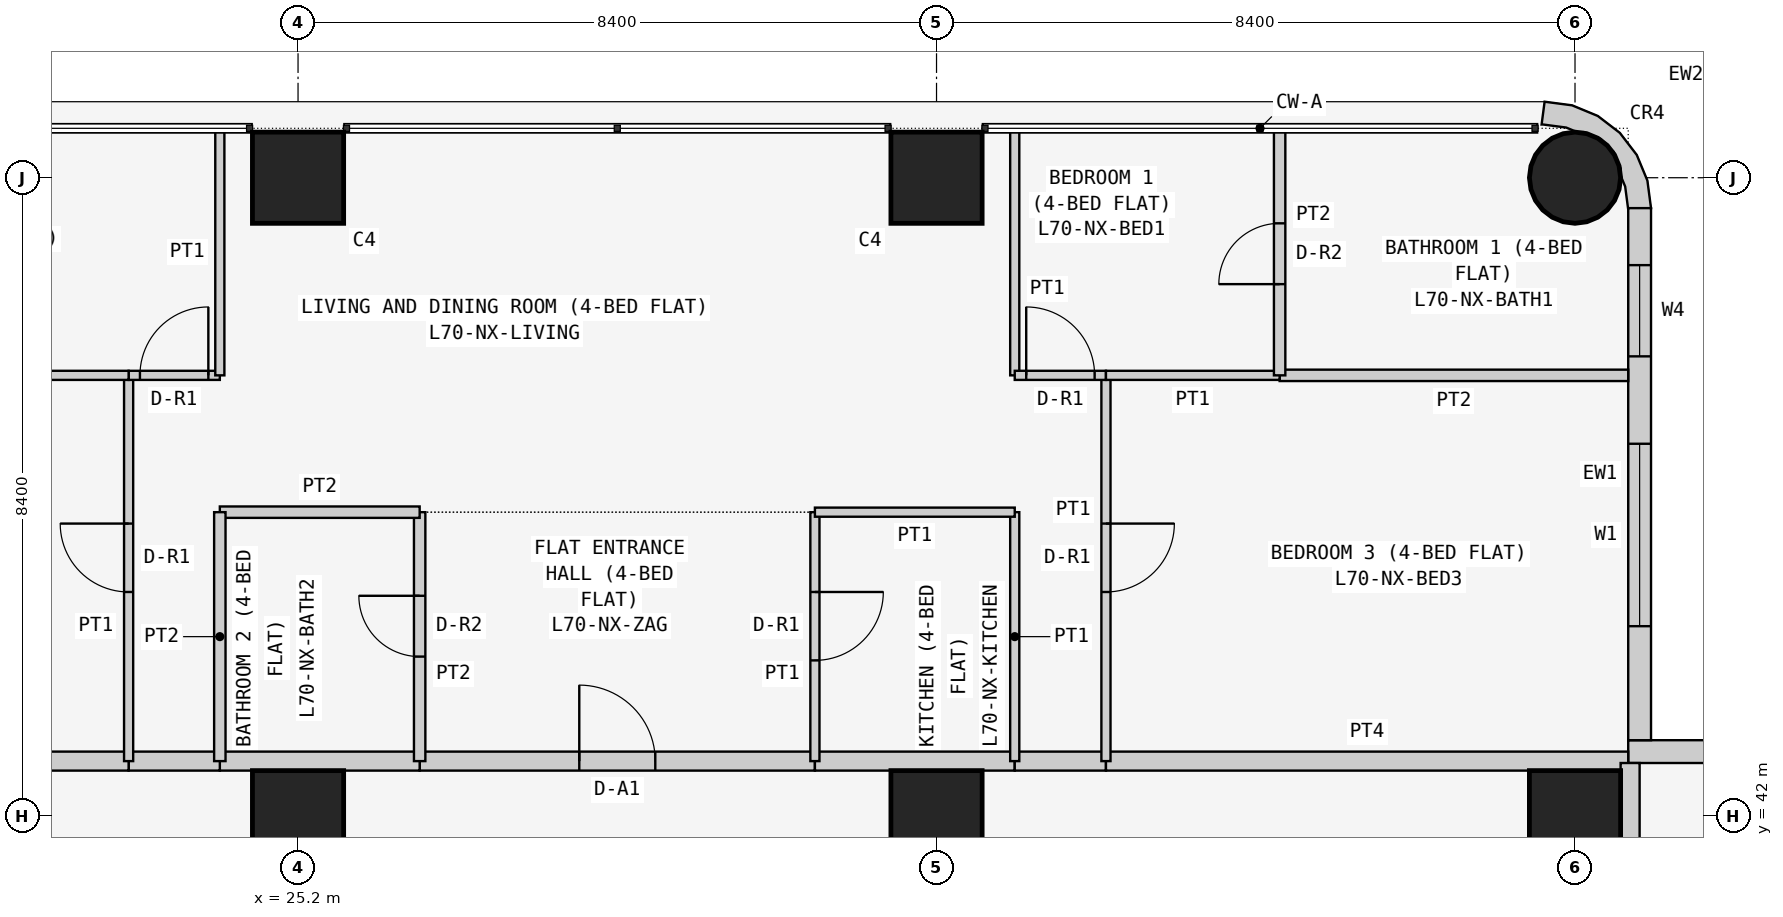
"""IFC4 building model, lengths in metres.
Left out: names, types, materials, properties, quantities, classifications, styles, units other than length and angle.
Written with IfcOpenShell. Run it as: python <this file> out.ifc"""

import sys

from ifc_helpers import new_model, si_unit, direction, frame, frame_2d, origin, origin_2d, place, context, subcontext, project, spatial, polyline, rectangle, circle, outline, extrude, element, fill, save


model = new_model("IFC4")
c1 = context("Model", 3, precision=1e-05, world=origin(), true_north=direction((0.0, 1.0)))
c2 = subcontext(c1, "Body", "Model", "MODEL_VIEW")
j1 = project(units=[si_unit("LENGTHUNIT", "METRE"), si_unit("PLANEANGLEUNIT", "RADIAN")], contexts=[c1])
p1 = place(None, origin())
s1 = spatial("IfcSite", under=j1, at=p1, CompositionType="ELEMENT")
p2 = place(p1, origin())
s2 = spatial("IfcBuilding", under=s1, at=p2, CompositionType="ELEMENT")
p3 = place(p2, frame((0.0, 0.0, 268.5)))
s3 = spatial("IfcBuildingStorey", under=s2, at=p3, CompositionType="ELEMENT", Elevation=268.5)
for number, where, z_axis, x_axis in (
    (1, (25.2, 42.0, 0.0), (0.0, 0.0, 1.0), (1.0, 0.0, 0.0)),
    (2, (25.2, 50.4, 0.0), (0.0, 0.0, 1.0), (1.0, 0.0, 0.0)),
    (3, (33.6, 42.0, 0.0), (0.0, 0.0, 1.0), (1.0, 0.0, 0.0)),
    (4, (33.6, 50.4, 0.0), (0.0, 0.0, 1.0), (1.0, 0.0, 0.0)),
    (5, (42.0, 42.0, 0.0), (0.0, 0.0, 1.0), (1.0, 0.0, 0.0)),
):
    element("IfcColumn", number, at=place(p3, frame(where, z_axis=z_axis, x_axis=x_axis)), inside=s3, PredefinedType="COLUMN", context=c2, shape_type="SweptSolid", body=[
        extrude(rectangle(XDim=1.2, YDim=1.2, at=origin_2d()), origin(), (0.0, 0.0, 1.0), 3.6),
    ])
p4 = place(p3, frame((42.0, 50.4, 0.0), z_axis=(0.0, 0.0, 1.0), x_axis=(1.0, 0.0, 0.0)))
e6 = element("IfcColumn", 6, at=p4, inside=s3, PredefinedType="COLUMN", context=c2, shape_type="SweptSolid", body=[
    extrude(circle(Radius=0.6, at=origin_2d()), origin(), (0.0, 0.0, 1.0), 3.6),
])
p5 = place(p3, frame((50.0, 42.85, 0.0), z_axis=(0.0, 0.0, 1.0), x_axis=(-1.0, 0.0, 0.0)))
e7 = element("IfcWall", 7, at=p5, inside=s3, PredefinedType="SOLIDWALL", context=c2, shape_type="SweptSolid", body=[
    extrude(rectangle(XDim=7.3, YDim=0.3, at=frame_2d((3.65, 0.0))), origin(), (0.0, 0.0, 1.0), 3.45),
])
p6 = place(p5, frame((3.1, 0.0, 0.9)))
e8 = element("IfcOpeningElement", 8, at=p6, cuts=e7, PredefinedType="OPENING", context=c2, shape_type="SweptSolid", body=[
    extrude(rectangle(XDim=2.4, YDim=1.5, at=frame_2d((1.2, 0.75))), frame((0.0, 0.16, 0.0), z_axis=(0.0, -1.0, 0.0), x_axis=(1.0, 0.0, 0.0)), (0.0, 0.0, 1.0), 0.32),
])
p7 = place(p5, frame((0.75, 0.0, 0.9)))
e9 = element("IfcOpeningElement", 9, at=p7, cuts=e7, PredefinedType="OPENING", context=c2, shape_type="SweptSolid", body=[
    extrude(rectangle(XDim=1.2, YDim=1.5, at=frame_2d((0.6, 0.75))), frame((0.0, 0.16, 0.0), z_axis=(0.0, -1.0, 0.0), x_axis=(1.0, 0.0, 0.0)), (0.0, 0.0, 1.0), 0.32),
])
p8 = place(p3, frame((42.85, 43.0, 0.0), z_axis=(0.0, 0.0, 1.0), x_axis=(0.0, 1.0, 0.0)))
e10 = element("IfcWall", 10, at=p8, inside=s3, PredefinedType="SOLIDWALL", context=c2, shape_type="SweptSolid", body=[
    extrude(rectangle(XDim=7.0, YDim=0.3, at=frame_2d((3.5, 0.0))), origin(), (0.0, 0.0, 1.0), 3.45),
])
p9 = place(p8, frame((1.5, 0.0, 0.9)))
e11 = element("IfcOpeningElement", 11, at=p9, cuts=e10, PredefinedType="OPENING", context=c2, shape_type="SweptSolid", body=[
    extrude(rectangle(XDim=2.4, YDim=1.5, at=frame_2d((1.2, 0.75))), frame((0.0, 0.16, 0.0), z_axis=(0.0, -1.0, 0.0), x_axis=(1.0, 0.0, 0.0)), (0.0, 0.0, 1.0), 0.32),
])
p10 = place(p8, frame((5.05, 0.0, 0.9)))
e12 = element("IfcOpeningElement", 12, at=p10, cuts=e10, PredefinedType="OPENING", context=c2, shape_type="SweptSolid", body=[
    extrude(rectangle(XDim=1.2, YDim=1.5, at=frame_2d((0.6, 0.75))), frame((0.0, 0.16, 0.0), z_axis=(0.0, -1.0, 0.0), x_axis=(1.0, 0.0, 0.0)), (0.0, 0.0, 1.0), 0.32),
])
p11 = place(p3, frame((42.576, 50.038, 0.0), z_axis=(0.0, 0.0, 1.0), x_axis=(0.707106781187, 0.707106781187, 0.0)))
e13 = element("IfcWall", 13, at=p11, inside=s3, PredefinedType="SOLIDWALL", context=c2, shape_type="SweptSolid", body=[
    extrude(outline(polyline([(0.233, 0.114), (0.047, -0.129), (0.033, -0.143), (0.273, -0.327), (0.495, -0.037), (0.635, 0.3), (0.683, 0.663), (0.635, 1.025), (0.495, 1.363), (0.273, 1.653), (0.033, 1.469), (0.047, 1.455), (0.233, 1.212), (0.292, 1.069), (0.358, 1.003), (0.449, 0.782), (0.449, 0.543), (0.358, 0.322), (0.292, 0.257), (0.233, 0.114)])), origin(), (0.0, 0.0, 1.0), 3.45),
])
p12 = place(p3, frame((26.8, 42.725, 0.0), z_axis=(0.0, 0.0, 1.0), x_axis=(1.0, 0.0, 0.0)))
e14 = element("IfcWall", 14, at=p12, inside=s3, PredefinedType="PARTITIONING", context=c2, shape_type="SweptSolid", body=[
    extrude(rectangle(XDim=5.2, YDim=0.25, at=frame_2d((2.6, 0.0))), origin(), (0.0, 0.0, 1.0), 3.45),
])
p13 = place(p12, frame((2.1, 0.0, 0.0)))
e15 = element("IfcOpeningElement", 15, at=p13, cuts=e14, PredefinedType="OPENING", context=c2, shape_type="SweptSolid", body=[
    extrude(rectangle(XDim=1.0, YDim=2.1, at=frame_2d((0.5, 1.05))), frame((0.0, 0.135, 0.0), z_axis=(0.0, -1.0, 0.0), x_axis=(1.0, 0.0, 0.0)), (0.0, 0.0, 1.0), 0.27),
])
p14 = place(p3, frame((24.171, 42.725, 0.0), z_axis=(0.0, 0.0, 1.0), x_axis=(1.0, 0.0, 0.0)))
e16 = element("IfcWall", 16, at=p14, inside=s3, PredefinedType="PARTITIONING", context=c2, shape_type="SweptSolid", body=[
    extrude(rectangle(XDim=2.629, YDim=0.25, at=frame_2d((1.314, 0.0))), origin(), (0.0, 0.0, 1.0), 3.45),
])
p15 = place(p3, frame((32.0, 42.725, 0.0), z_axis=(0.0, 0.0, 1.0), x_axis=(1.0, 0.0, 0.0)))
e17 = element("IfcWall", 17, at=p15, inside=s3, PredefinedType="PARTITIONING", context=c2, shape_type="SweptSolid", body=[
    extrude(rectangle(XDim=2.629, YDim=0.25, at=frame_2d((1.314, 0.0))), origin(), (0.0, 0.0, 1.0), 3.45),
])
p16 = place(p3, frame((22.971, 42.725, 0.0), z_axis=(0.0, 0.0, 1.0), x_axis=(1.0, 0.0, 0.0)))
e18 = element("IfcWall", 18, at=p16, inside=s3, PredefinedType="PARTITIONING", context=c2, shape_type="SweptSolid", body=[
    extrude(rectangle(XDim=1.2, YDim=0.25, at=frame_2d((0.6, 0.0))), origin(), (0.0, 0.0, 1.0), 3.45),
])
p17 = place(p3, frame((34.629, 42.725, 0.0), z_axis=(0.0, 0.0, 1.0), x_axis=(1.0, 0.0, 0.0)))
e19 = element("IfcWall", 19, at=p17, inside=s3, PredefinedType="PARTITIONING", context=c2, shape_type="SweptSolid", body=[
    extrude(rectangle(XDim=1.2, YDim=0.25, at=frame_2d((0.6, 0.0))), origin(), (0.0, 0.0, 1.0), 3.45),
])
for number, where, z_axis, x_axis in (
    (20, (16.1, 42.725, 0.0), (0.0, 0.0, 1.0), (1.0, 0.0, 0.0)),
    (21, (35.829, 42.725, 0.0), (0.0, 0.0, 1.0), (1.0, 0.0, 0.0)),
    (22, (42.725, 42.7, 0.0), (0.0, 0.0, 1.0), (0.0, -1.0, 0.0)),
):
    element("IfcWall", number, at=place(p3, frame(where, z_axis=z_axis, x_axis=x_axis)), inside=s3, PredefinedType="PARTITIONING", context=c2, shape_type="SweptSolid", body=[
        extrude(rectangle(XDim=6.871, YDim=0.25, at=frame_2d((3.436, 0.0))), origin(), (0.0, 0.0, 1.0), 3.45),
    ])
p18 = place(p3, frame((26.8, 46.0, 0.0), z_axis=(0.0, 0.0, 1.0), x_axis=(0.0, -1.0, 0.0)))
e23 = element("IfcWall", 23, at=p18, inside=s3, PredefinedType="PARTITIONING", context=c2, shape_type="SweptSolid", body=[
    extrude(rectangle(XDim=3.275, YDim=0.15, at=frame_2d((1.637, 0.0))), origin(), (0.0, 0.0, 1.0), 3.45),
])
p19 = place(p18, frame((1.1, 0.0, 0.0)))
e24 = element("IfcOpeningElement", 24, at=p19, cuts=e23, PredefinedType="OPENING", context=c2, shape_type="SweptSolid", body=[
    extrude(rectangle(XDim=0.8, YDim=2.1, at=frame_2d((0.4, 1.05))), frame((0.0, 0.085, 0.0), z_axis=(0.0, -1.0, 0.0), x_axis=(1.0, 0.0, 0.0)), (0.0, 0.0, 1.0), 0.17),
])
p20 = place(p3, frame((32.0, 42.725, 0.0), z_axis=(0.0, 0.0, 1.0), x_axis=(0.0, 1.0, 0.0)))
e25 = element("IfcWall", 25, at=p20, inside=s3, PredefinedType="PARTITIONING", context=c2, shape_type="SweptSolid", body=[
    extrude(rectangle(XDim=3.275, YDim=0.12, at=frame_2d((1.637, 0.0))), origin(), (0.0, 0.0, 1.0), 3.45),
])
p21 = place(p20, frame((1.325, 0.0, 0.0)))
e26 = element("IfcOpeningElement", 26, at=p21, cuts=e25, PredefinedType="OPENING", context=c2, shape_type="SweptSolid", body=[
    extrude(rectangle(XDim=0.9, YDim=2.1, at=frame_2d((0.45, 1.05))), frame((0.0, 0.07, 0.0), z_axis=(0.0, -1.0, 0.0), x_axis=(1.0, 0.0, 0.0)), (0.0, 0.0, 1.0), 0.14),
])
p22 = place(p3, frame((26.8, 46.0, 0.0), z_axis=(0.0, 0.0, 1.0), x_axis=(-1.0, 0.0, 0.0)))
e27 = element("IfcWall", 27, at=p22, inside=s3, PredefinedType="PARTITIONING", context=c2, shape_type="SweptSolid", body=[
    extrude(rectangle(XDim=2.629, YDim=0.15, at=frame_2d((1.314, 0.0))), origin(), (0.0, 0.0, 1.0), 3.45),
])
p23 = place(p3, frame((24.171, 46.0, 0.0), z_axis=(0.0, 0.0, 1.0), x_axis=(0.0, -1.0, 0.0)))
e28 = element("IfcWall", 28, at=p23, inside=s3, PredefinedType="PARTITIONING", context=c2, shape_type="SweptSolid", body=[
    extrude(rectangle(XDim=3.275, YDim=0.15, at=frame_2d((1.637, 0.0))), origin(), (0.0, 0.0, 1.0), 3.45),
])
p24 = place(p3, frame((34.629, 42.725, 0.0), z_axis=(0.0, 0.0, 1.0), x_axis=(0.0, 1.0, 0.0)))
e29 = element("IfcWall", 29, at=p24, inside=s3, PredefinedType="PARTITIONING", context=c2, shape_type="SweptSolid", body=[
    extrude(rectangle(XDim=3.275, YDim=0.12, at=frame_2d((1.637, 0.0))), origin(), (0.0, 0.0, 1.0), 3.45),
])
p25 = place(p3, frame((34.629, 46.0, 0.0), z_axis=(0.0, 0.0, 1.0), x_axis=(-1.0, 0.0, 0.0)))
e30 = element("IfcWall", 30, at=p25, inside=s3, PredefinedType="PARTITIONING", context=c2, shape_type="SweptSolid", body=[
    extrude(rectangle(XDim=2.629, YDim=0.12, at=frame_2d((1.314, 0.0))), origin(), (0.0, 0.0, 1.0), 3.45),
])
p26 = place(p3, frame((22.971, 42.725, 0.0), z_axis=(0.0, 0.0, 1.0), x_axis=(0.0, 1.0, 0.0)))
e31 = element("IfcWall", 31, at=p26, inside=s3, PredefinedType="PARTITIONING", context=c2, shape_type="SweptSolid", body=[
    extrude(rectangle(XDim=5.075, YDim=0.12, at=frame_2d((2.538, 0.0))), origin(), (0.0, 0.0, 1.0), 3.45),
])
p27 = place(p26, frame((2.225, 0.0, 0.0)))
e32 = element("IfcOpeningElement", 32, at=p27, cuts=e31, PredefinedType="OPENING", context=c2, shape_type="SweptSolid", body=[
    extrude(rectangle(XDim=0.9, YDim=2.1, at=frame_2d((0.45, 1.05))), frame((0.0, 0.07, 0.0), z_axis=(0.0, -1.0, 0.0), x_axis=(1.0, 0.0, 0.0)), (0.0, 0.0, 1.0), 0.14),
])
p28 = place(p3, frame((22.971, 47.8, 0.0), z_axis=(0.0, 0.0, 1.0), x_axis=(1.0, 0.0, 0.0)))
e33 = element("IfcWall", 33, at=p28, inside=s3, PredefinedType="PARTITIONING", context=c2, shape_type="SweptSolid", body=[
    extrude(rectangle(XDim=1.2, YDim=0.12, at=frame_2d((0.6, 0.0))), origin(), (0.0, 0.0, 1.0), 3.45),
])
p29 = place(p28, frame((0.149, 0.0, 0.0)))
e34 = element("IfcOpeningElement", 34, at=p29, cuts=e33, PredefinedType="OPENING", context=c2, shape_type="SweptSolid", body=[
    extrude(rectangle(XDim=0.9, YDim=2.1, at=frame_2d((0.45, 1.05))), frame((0.0, 0.07, 0.0), z_axis=(0.0, -1.0, 0.0), x_axis=(1.0, 0.0, 0.0)), (0.0, 0.0, 1.0), 0.14),
])
p30 = place(p3, frame((24.171, 47.8, 0.0), z_axis=(0.0, 0.0, 1.0), x_axis=(0.0, 1.0, 0.0)))
e35 = element("IfcWall", 35, at=p30, inside=s3, PredefinedType="PARTITIONING", context=c2, shape_type="SweptSolid", body=[
    extrude(rectangle(XDim=3.25, YDim=0.12, at=frame_2d((1.625, 0.0))), origin(), (0.0, 0.0, 1.0), 3.45),
])
p31 = place(p3, frame((35.829, 47.8, 0.0), z_axis=(0.0, 0.0, 1.0), x_axis=(0.0, -1.0, 0.0)))
e36 = element("IfcWall", 36, at=p31, inside=s3, PredefinedType="PARTITIONING", context=c2, shape_type="SweptSolid", body=[
    extrude(rectangle(XDim=5.075, YDim=0.12, at=frame_2d((2.538, 0.0))), origin(), (0.0, 0.0, 1.0), 3.45),
])
p32 = place(p31, frame((1.95, 0.0, 0.0)))
e37 = element("IfcOpeningElement", 37, at=p32, cuts=e36, PredefinedType="OPENING", context=c2, shape_type="SweptSolid", body=[
    extrude(rectangle(XDim=0.9, YDim=2.1, at=frame_2d((0.45, 1.05))), frame((0.0, 0.07, 0.0), z_axis=(0.0, -1.0, 0.0), x_axis=(1.0, 0.0, 0.0)), (0.0, 0.0, 1.0), 0.14),
])
p33 = place(p3, frame((34.629, 51.05, 0.0), z_axis=(0.0, 0.0, 1.0), x_axis=(0.0, -1.0, 0.0)))
e38 = element("IfcWall", 38, at=p33, inside=s3, PredefinedType="PARTITIONING", context=c2, shape_type="SweptSolid", body=[
    extrude(rectangle(XDim=3.25, YDim=0.12, at=frame_2d((1.625, 0.0))), origin(), (0.0, 0.0, 1.0), 3.45),
])
p34 = place(p3, frame((34.629, 47.8, 0.0), z_axis=(0.0, 0.0, 1.0), x_axis=(1.0, 0.0, 0.0)))
e39 = element("IfcWall", 39, at=p34, inside=s3, PredefinedType="PARTITIONING", context=c2, shape_type="SweptSolid", body=[
    extrude(rectangle(XDim=1.2, YDim=0.12, at=frame_2d((0.6, 0.0))), origin(), (0.0, 0.0, 1.0), 3.45),
])
p35 = place(p34, frame((0.151, 0.0, 0.0)))
e40 = element("IfcOpeningElement", 40, at=p35, cuts=e39, PredefinedType="OPENING", context=c2, shape_type="SweptSolid", body=[
    extrude(rectangle(XDim=0.9, YDim=2.1, at=frame_2d((0.45, 1.05))), frame((0.0, 0.07, 0.0), z_axis=(0.0, -1.0, 0.0), x_axis=(1.0, 0.0, 0.0)), (0.0, 0.0, 1.0), 0.14),
])
p36 = place(p3, frame((22.971, 47.8, 0.0), z_axis=(0.0, 0.0, 1.0), x_axis=(-1.0, 0.0, 0.0)))
e41 = element("IfcWall", 41, at=p36, inside=s3, PredefinedType="PARTITIONING", context=c2, shape_type="SweptSolid", body=[
    extrude(rectangle(XDim=6.871, YDim=0.12, at=frame_2d((3.436, 0.0))), origin(), (0.0, 0.0, 1.0), 3.45),
])
p37 = place(p3, frame((42.7, 47.8, 0.0), z_axis=(0.0, 0.0, 1.0), x_axis=(-1.0, 0.0, 0.0)))
e42 = element("IfcWall", 42, at=p37, inside=s3, PredefinedType="PARTITIONING", context=c2, shape_type="SweptSolid", body=[
    extrude(rectangle(XDim=4.586, YDim=0.15, at=frame_2d((2.293, 0.0))), origin(), (0.0, 0.0, 1.0), 3.45),
])
p38 = place(p3, frame((38.114, 47.8, 0.0), z_axis=(0.0, 0.0, 1.0), x_axis=(-1.0, 0.0, 0.0)))
e43 = element("IfcWall", 43, at=p38, inside=s3, PredefinedType="PARTITIONING", context=c2, shape_type="SweptSolid", body=[
    extrude(rectangle(XDim=2.285, YDim=0.12, at=frame_2d((1.143, 0.0))), origin(), (0.0, 0.0, 1.0), 3.45),
])
p39 = place(p3, frame((38.114, 51.05, 0.0), z_axis=(0.0, 0.0, 1.0), x_axis=(0.0, -1.0, 0.0)))
e44 = element("IfcWall", 44, at=p39, inside=s3, PredefinedType="PARTITIONING", context=c2, shape_type="SweptSolid", body=[
    extrude(rectangle(XDim=3.25, YDim=0.15, at=frame_2d((1.625, 0.0))), origin(), (0.0, 0.0, 1.0), 3.45),
])
p40 = place(p39, frame((1.25, 0.0, 0.0)))
e45 = element("IfcOpeningElement", 45, at=p40, cuts=e44, PredefinedType="OPENING", context=c2, shape_type="SweptSolid", body=[
    extrude(rectangle(XDim=0.8, YDim=2.1, at=frame_2d((0.4, 1.05))), frame((0.0, 0.085, 0.0), z_axis=(0.0, -1.0, 0.0), x_axis=(1.0, 0.0, 0.0)), (0.0, 0.0, 1.0), 0.17),
])
p41 = place(p9, origin())
e46 = element("IfcWindow", 46, at=p41, inside=s3, PartitioningType="SINGLE_PANEL", PredefinedType="WINDOW", context=c2, shape_type="SweptSolid", body=[
    extrude(rectangle(XDim=2.4, YDim=1.5, at=frame_2d((1.2, 0.75))), frame((0.0, 0.03, 0.0), z_axis=(0.0, -1.0, 0.0), x_axis=(1.0, 0.0, 0.0)), (0.0, 0.0, 1.0), 0.06),
])
fill(e11, e46)
p42 = place(p10, origin())
e47 = element("IfcWindow", 47, at=p42, inside=s3, PartitioningType="SINGLE_PANEL", PredefinedType="WINDOW", context=c2, shape_type="SweptSolid", body=[
    extrude(rectangle(XDim=1.2, YDim=1.5, at=frame_2d((0.6, 0.75))), frame((0.0, 0.03, 0.0), z_axis=(0.0, -1.0, 0.0), x_axis=(1.0, 0.0, 0.0)), (0.0, 0.0, 1.0), 0.06),
])
fill(e12, e47)
p43 = place(p13, origin())
e48 = element("IfcDoor", 48, at=p43, inside=s3, OperationType="SINGLE_SWING_LEFT", PredefinedType="DOOR", context=c2, shape_type="SweptSolid", body=[
    extrude(rectangle(XDim=1.0, YDim=2.1, at=frame_2d((0.5, 1.05))), frame((0.0, 0.025, 0.0), z_axis=(0.0, -1.0, 0.0), x_axis=(1.0, 0.0, 0.0)), (0.0, 0.0, 1.0), 0.05),
])
fill(e15, e48)
p44 = place(p19, frame((0.8, 0.0, 0.0), z_axis=(0.0, 0.0, 1.0), x_axis=(-1.0, 0.0, 0.0)))
e49 = element("IfcDoor", 49, at=p44, inside=s3, OperationType="SINGLE_SWING_RIGHT", PredefinedType="DOOR", context=c2, shape_type="SweptSolid", body=[
    extrude(rectangle(XDim=0.8, YDim=2.1, at=frame_2d((0.4, 1.05))), frame((0.0, 0.025, 0.0), z_axis=(0.0, -1.0, 0.0), x_axis=(1.0, 0.0, 0.0)), (0.0, 0.0, 1.0), 0.05),
])
fill(e24, e49)
p45 = place(p21, frame((0.9, 0.0, 0.0), z_axis=(0.0, 0.0, 1.0), x_axis=(-1.0, 0.0, 0.0)))
e50 = element("IfcDoor", 50, at=p45, inside=s3, OperationType="SINGLE_SWING_LEFT", PredefinedType="DOOR", context=c2, shape_type="SweptSolid", body=[
    extrude(rectangle(XDim=0.9, YDim=2.1, at=frame_2d((0.45, 1.05))), frame((0.0, 0.025, 0.0), z_axis=(0.0, -1.0, 0.0), x_axis=(1.0, 0.0, 0.0)), (0.0, 0.0, 1.0), 0.05),
])
fill(e26, e50)
p46 = place(p27, origin())
e51 = element("IfcDoor", 51, at=p46, inside=s3, OperationType="SINGLE_SWING_RIGHT", PredefinedType="DOOR", context=c2, shape_type="SweptSolid", body=[
    extrude(rectangle(XDim=0.9, YDim=2.1, at=frame_2d((0.45, 1.05))), frame((0.0, 0.025, 0.0), z_axis=(0.0, -1.0, 0.0), x_axis=(1.0, 0.0, 0.0)), (0.0, 0.0, 1.0), 0.05),
])
fill(e32, e51)
p47 = place(p29, origin())
e52 = element("IfcDoor", 52, at=p47, inside=s3, OperationType="SINGLE_SWING_RIGHT", PredefinedType="DOOR", context=c2, shape_type="SweptSolid", body=[
    extrude(rectangle(XDim=0.9, YDim=2.1, at=frame_2d((0.45, 1.05))), frame((0.0, 0.025, 0.0), z_axis=(0.0, -1.0, 0.0), x_axis=(1.0, 0.0, 0.0)), (0.0, 0.0, 1.0), 0.05),
])
fill(e34, e52)
p48 = place(p32, origin())
e53 = element("IfcDoor", 53, at=p48, inside=s3, OperationType="SINGLE_SWING_LEFT", PredefinedType="DOOR", context=c2, shape_type="SweptSolid", body=[
    extrude(rectangle(XDim=0.9, YDim=2.1, at=frame_2d((0.45, 1.05))), frame((0.0, 0.025, 0.0), z_axis=(0.0, -1.0, 0.0), x_axis=(1.0, 0.0, 0.0)), (0.0, 0.0, 1.0), 0.05),
])
fill(e37, e53)
p49 = place(p35, origin())
e54 = element("IfcDoor", 54, at=p49, inside=s3, OperationType="SINGLE_SWING_LEFT", PredefinedType="DOOR", context=c2, shape_type="SweptSolid", body=[
    extrude(rectangle(XDim=0.9, YDim=2.1, at=frame_2d((0.45, 1.05))), frame((0.0, 0.025, 0.0), z_axis=(0.0, -1.0, 0.0), x_axis=(1.0, 0.0, 0.0)), (0.0, 0.0, 1.0), 0.05),
])
fill(e40, e54)
p50 = place(p40, frame((0.8, 0.0, 0.0), z_axis=(0.0, 0.0, 1.0), x_axis=(-1.0, 0.0, 0.0)))
e55 = element("IfcDoor", 55, at=p50, inside=s3, OperationType="SINGLE_SWING_LEFT", PredefinedType="DOOR", context=c2, shape_type="SweptSolid", body=[
    extrude(rectangle(XDim=0.8, YDim=2.1, at=frame_2d((0.4, 1.05))), frame((0.0, 0.025, 0.0), z_axis=(0.0, -1.0, 0.0), x_axis=(1.0, 0.0, 0.0)), (0.0, 0.0, 1.0), 0.05),
])
fill(e45, e55)
save(model, sys.argv[1])
